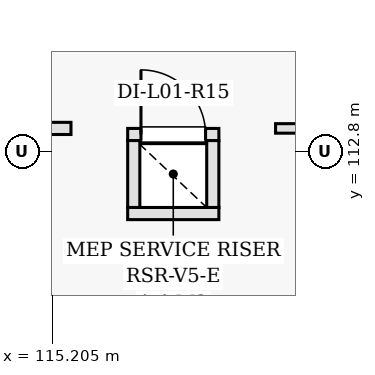
"""IFC4 building model, lengths in metres.
Left out: names, types, materials, properties, quantities, classifications, styles, units other than length and angle.
Written with IfcOpenShell. Run it as: python <this file> out.ifc"""

import sys

from ifc_helpers import new_model, si_unit, direction, frame, frame_2d, origin, place, context, subcontext, project, spatial, rectangle, extrude, element, fill, save


model = new_model("IFC4")
c1 = context("Model", 3, precision=1e-05, world=origin(), true_north=direction((0.0, 1.0)))
c2 = subcontext(c1, "Body", "Model", "MODEL_VIEW")
j1 = project(units=[si_unit("LENGTHUNIT", "METRE"), si_unit("PLANEANGLEUNIT", "RADIAN")], contexts=[c1])
p1 = place(None, origin())
s1 = spatial("IfcSite", under=j1, at=p1, CompositionType="ELEMENT")
p2 = place(p1, origin())
s2 = spatial("IfcBuilding", under=s1, at=p2, CompositionType="ELEMENT")
p3 = place(p2, frame((0.0, 0.0, 4.8)))
s3 = spatial("IfcBuildingStorey", under=s2, at=p3, CompositionType="ELEMENT", Elevation=4.8)
p4 = place(p3, frame((116.2, 111.98, 0.0), z_axis=(0.0, 0.0, 1.0), x_axis=(1.0, 0.0, 0.0)))
e1 = element("IfcWall", 1, at=p4, inside=s3, PredefinedType="PARTITIONING", context=c2, shape_type="SweptSolid", body=[
    extrude(rectangle(XDim=1.2, YDim=0.16, at=frame_2d((0.6, 0.0))), origin(), (0.0, 0.0, 1.0), 4.48),
])
p5 = place(p3, frame((116.2, 113.02, 0.0), z_axis=(0.0, 0.0, 1.0), x_axis=(1.0, 0.0, 0.0)))
e2 = element("IfcWall", 2, at=p5, inside=s3, PredefinedType="PARTITIONING", context=c2, shape_type="SweptSolid", body=[
    extrude(rectangle(XDim=1.2, YDim=0.16, at=frame_2d((0.6, 0.0))), origin(), (0.0, 0.0, 1.0), 4.48),
])
p6 = place(p5, frame((0.175, 0.0, 0.0)))
e3 = element("IfcOpeningElement", 3, at=p6, cuts=e2, PredefinedType="OPENING", context=c2, shape_type="SweptSolid", body=[
    extrude(rectangle(XDim=0.85, YDim=2.02, at=frame_2d((0.425, 1.01))), frame((0.0, 0.09, 0.0), z_axis=(0.0, -1.0, 0.0), x_axis=(1.0, 0.0, 0.0)), (0.0, 0.0, 1.0), 0.18),
])
for number, where, z_axis, x_axis in (
    (4, (116.28, 112.06, 0.0), (0.0, 0.0, 1.0), (0.0, 1.0, 0.0)),
    (5, (117.32, 112.06, 0.0), (0.0, 0.0, 1.0), (0.0, 1.0, 0.0)),
):
    element("IfcWall", number, at=place(p3, frame(where, z_axis=z_axis, x_axis=x_axis)), inside=s3, PredefinedType="PARTITIONING", context=c2, shape_type="SweptSolid", body=[
        extrude(rectangle(XDim=0.88, YDim=0.16, at=frame_2d((0.44, 0.0))), origin(), (0.0, 0.0, 1.0), 4.48),
    ])
p7 = place(p3, frame((102.487, 113.1, 0.0), z_axis=(0.0, 0.0, 1.0), x_axis=(1.0, 0.0, 0.0)))
e6 = element("IfcWall", 6, at=p7, inside=s3, PredefinedType="PARTITIONING", context=c2, shape_type="SweptSolid", body=[
    extrude(rectangle(XDim=12.967, YDim=0.16, at=frame_2d((6.483, 0.0))), origin(), (0.0, 0.0, 1.0), 3.565),
])
p8 = place(p7, frame((5.583, 0.0, 0.0)))
e7 = element("IfcOpeningElement", 7, at=p8, cuts=e6, PredefinedType="OPENING", context=c2, shape_type="SweptSolid", body=[
    extrude(rectangle(XDim=1.8, YDim=2.2, at=frame_2d((0.9, 1.1))), frame((0.0, 0.09, 0.0), z_axis=(0.0, -1.0, 0.0), x_axis=(1.0, 0.0, 0.0)), (0.0, 0.0, 1.0), 0.18),
])
p9 = place(p3, frame((118.146, 113.1, 0.0), z_axis=(0.0, 0.0, 1.0), x_axis=(1.0, 0.0, 0.0)))
e8 = element("IfcWall", 8, at=p9, inside=s3, PredefinedType="PARTITIONING", context=c2, shape_type="SweptSolid", body=[
    extrude(rectangle(XDim=6.854, YDim=0.125, at=frame_2d((3.427, 0.0))), origin(), (0.0, 0.0, 1.0), 3.715),
])
p10 = place(p6, origin())
e9 = element("IfcDoor", 9, at=p10, inside=s3, OperationType="SINGLE_SWING_LEFT", PredefinedType="DOOR", context=c2, shape_type="SweptSolid", body=[
    extrude(rectangle(XDim=0.85, YDim=2.02, at=frame_2d((0.425, 1.01))), frame((0.0, 0.025, 0.0), z_axis=(0.0, -1.0, 0.0), x_axis=(1.0, 0.0, 0.0)), (0.0, 0.0, 1.0), 0.05),
])
fill(e3, e9)
save(model, sys.argv[1])
